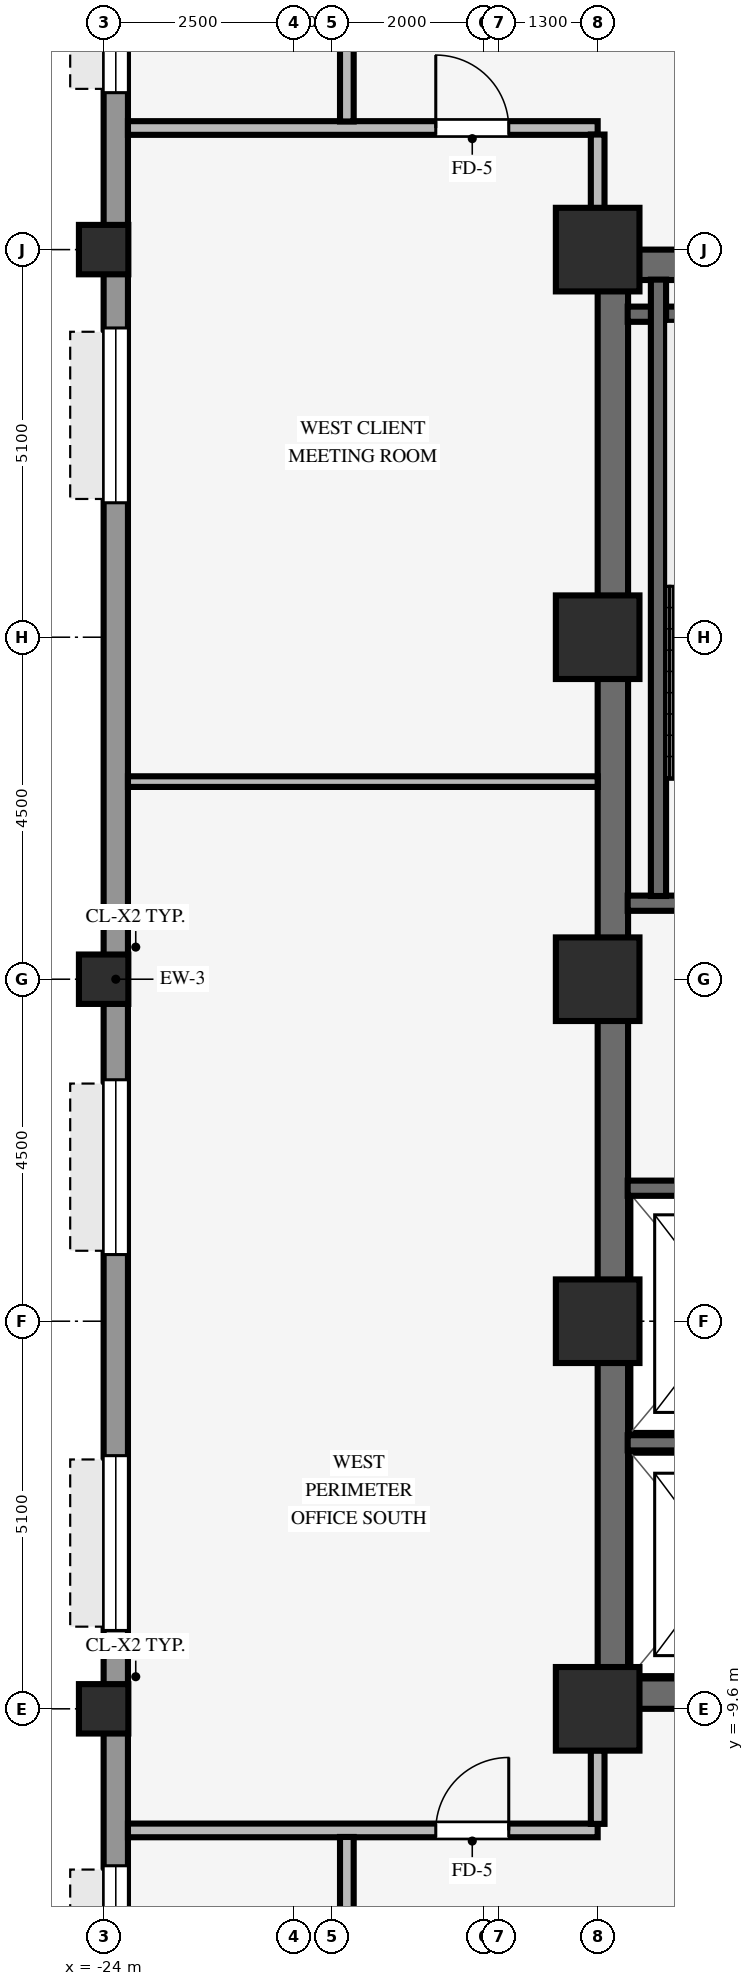
"""IFC4 building model, lengths in metres.
Left out: names, types, materials, properties, quantities, classifications, styles, units other than length and angle.
Written with IfcOpenShell. Run it as: python <this file> out.ifc"""

import sys

from ifc_helpers import new_model, si_unit, direction, frame, frame_2d, origin, origin_2d, place, context, subcontext, project, spatial, rectangle, hollow_rectangle, extrude, source, transform, mapped, element, fill, save


model = new_model("IFC4")
c1 = context("Model", 3, precision=1e-05, world=origin(), true_north=direction((0.0, 1.0)))
c2 = subcontext(c1, "Body", "Model", "MODEL_VIEW")
j1 = project(units=[si_unit("LENGTHUNIT", "METRE"), si_unit("PLANEANGLEUNIT", "RADIAN")], contexts=[c1])
p1 = place(None, origin())
s1 = spatial("IfcSite", under=j1, at=p1, CompositionType="ELEMENT")
p2 = place(p1, origin())
s2 = spatial("IfcBuilding", under=s1, at=p2, CompositionType="ELEMENT")
p3 = place(p2, frame((0.0, 0.0, 109.25)))
s3 = spatial("IfcBuildingStorey", under=s2, at=p3, CompositionType="ELEMENT", Elevation=109.25)
for number, where, z_axis, x_axis in (
    (1, (-17.5, -9.4, 0.0), (0.0, 0.0, 1.0), (1.0, 0.0, 0.0)),
    (2, (-17.5, 9.4, 0.0), (0.0, 0.0, 1.0), (1.0, 0.0, 0.0)),
):
    element("IfcWall", number, at=place(p3, frame(where, z_axis=z_axis, x_axis=x_axis)), inside=s3, PredefinedType="SHEAR", context=c2, shape_type="SweptSolid", body=[
        extrude(rectangle(XDim=8.5, YDim=0.4, at=frame_2d((4.25, 0.0))), origin(), (0.0, 0.0, 1.0), 3.37),
    ])
p4 = place(p3, frame((-17.3, -9.205, 0.0), z_axis=(0.0, 0.0, 1.0), x_axis=(0.0, 1.0, 0.0)))
e3 = element("IfcWall", 3, at=p4, inside=s3, PredefinedType="SHEAR", context=c2, shape_type="SweptSolid", body=[
    extrude(rectangle(XDim=18.41, YDim=0.4, at=frame_2d((9.205, 0.0))), origin(), (0.0, 0.0, 1.0), 3.37),
])
for number, where, z_axis, x_axis in (
    (4, (-17.5, -9.6, 0.0), (0.0, 0.0, 1.0), (1.0, 0.0, 0.0)),
    (5, (-17.5, -4.5, 0.0), (0.0, 0.0, 1.0), (1.0, 0.0, 0.0)),
    (6, (-17.5, 4.5, 0.0), (0.0, 0.0, 1.0), (1.0, 0.0, 0.0)),
    (7, (-17.5, 9.6, 0.0), (0.0, 0.0, 1.0), (1.0, 0.0, 0.0)),
    (8, (-17.5, 0.0, 0.0), (0.0, 0.0, 1.0), (1.0, 0.0, 0.0)),
):
    element("IfcColumn", number, at=place(p3, frame(where, z_axis=z_axis, x_axis=x_axis)), inside=s3, PredefinedType="COLUMN", context=c2, shape_type="SweptSolid", body=[
        extrude(rectangle(XDim=1.1, YDim=1.1, at=origin_2d()), origin(), (0.0, 0.0, 1.0), 3.37),
    ])
for number, where, z_axis, x_axis in (
    (9, (-24.0, -9.6, 0.0), (0.0, 0.0, 1.0), (1.0, 0.0, 0.0)),
    (10, (-24.0, 0.0, 0.0), (0.0, 0.0, 1.0), (1.0, 0.0, 0.0)),
    (11, (-24.0, 9.6, 0.0), (0.0, 0.0, 1.0), (1.0, 0.0, 0.0)),
):
    element("IfcColumn", number, at=place(p3, frame(where, z_axis=z_axis, x_axis=x_axis)), inside=s3, PredefinedType="COLUMN", context=c2, shape_type="SweptSolid", body=[
        extrude(hollow_rectangle(XDim=0.65, YDim=0.65, WallThickness=0.04, InnerFilletRadius=0.04, OuterFilletRadius=0.08, at=origin_2d()), origin(), (0.0, 0.0, 1.0), 3.37),
    ])
p5 = place(p3, frame((-23.84, -20.784, 0.0), z_axis=(0.0, 0.0, 1.0), x_axis=(0.0, 1.0, 0.0)))
e12 = element("IfcWall", 12, at=p5, inside=s3, PredefinedType="STANDARD", context=c2, shape_type="SweptSolid", body=[
    extrude(rectangle(XDim=41.568, YDim=0.32, at=frame_2d((20.784, 0.0))), origin(), (0.0, 0.0, 1.0), 2.705),
])
p6 = place(p5, frame((6.819, 0.0, 0.8)))
e13 = element("IfcOpeningElement", 13, at=p6, cuts=e12, PredefinedType="OPENING", context=c2, shape_type="SweptSolid", body=[
    extrude(rectangle(XDim=2.3, YDim=1.62, at=frame_2d((1.15, 0.81))), frame((0.0, 0.17, 0.0), z_axis=(0.0, -1.0, 0.0), x_axis=(1.0, 0.0, 0.0)), (0.0, 0.0, 1.0), 0.34),
])
p7 = place(p5, frame((12.215, 0.0, 0.8)))
e14 = element("IfcOpeningElement", 14, at=p7, cuts=e12, PredefinedType="OPENING", context=c2, shape_type="SweptSolid", body=[
    extrude(rectangle(XDim=2.3, YDim=1.62, at=frame_2d((1.15, 0.81))), frame((0.0, 0.17, 0.0), z_axis=(0.0, -1.0, 0.0), x_axis=(1.0, 0.0, 0.0)), (0.0, 0.0, 1.0), 0.34),
])
p8 = place(p5, frame((17.161, 0.0, 0.8)))
e15 = element("IfcOpeningElement", 15, at=p8, cuts=e12, PredefinedType="OPENING", context=c2, shape_type="SweptSolid", body=[
    extrude(rectangle(XDim=2.3, YDim=1.62, at=frame_2d((1.15, 0.81))), frame((0.0, 0.17, 0.0), z_axis=(0.0, -1.0, 0.0), x_axis=(1.0, 0.0, 0.0)), (0.0, 0.0, 1.0), 0.34),
])
p9 = place(p5, frame((27.053, 0.0, 0.8)))
e16 = element("IfcOpeningElement", 16, at=p9, cuts=e12, PredefinedType="OPENING", context=c2, shape_type="SweptSolid", body=[
    extrude(rectangle(XDim=2.3, YDim=1.62, at=frame_2d((1.15, 0.81))), frame((0.0, 0.17, 0.0), z_axis=(0.0, -1.0, 0.0), x_axis=(1.0, 0.0, 0.0)), (0.0, 0.0, 1.0), 0.34),
])
p10 = place(p5, frame((32.449, 0.0, 0.8)))
e17 = element("IfcOpeningElement", 17, at=p10, cuts=e12, PredefinedType="OPENING", context=c2, shape_type="SweptSolid", body=[
    extrude(rectangle(XDim=2.3, YDim=1.62, at=frame_2d((1.15, 0.81))), frame((0.0, 0.17, 0.0), z_axis=(0.0, -1.0, 0.0), x_axis=(1.0, 0.0, 0.0)), (0.0, 0.0, 1.0), 0.34),
])
for number, where, z_axis, x_axis in (
    (18, (-17.105, 1.0, 0.0), (0.0, 0.0, 1.0), (1.0, 0.0, 0.0)),
    (19, (-17.105, 8.75, 0.0), (0.0, 0.0, 1.0), (1.0, 0.0, 0.0)),
):
    element("IfcWall", number, at=place(p3, frame(where, z_axis=z_axis, x_axis=x_axis)), inside=s3, PredefinedType="SHEAR", context=c2, shape_type="SweptSolid", body=[
        extrude(rectangle(XDim=3.57, YDim=0.2, at=frame_2d((1.785, 0.0))), origin(), (0.0, 0.0, 1.0), 3.37),
    ])
p11 = place(p3, frame((-16.7, 1.095, 0.0), z_axis=(0.0, 0.0, 1.0), x_axis=(0.0, 1.0, 0.0)))
e20 = element("IfcWall", 20, at=p11, inside=s3, PredefinedType="SHEAR", context=c2, shape_type="SweptSolid", body=[
    extrude(rectangle(XDim=8.11, YDim=0.2, at=frame_2d((4.055, 0.0))), origin(), (0.0, 0.0, 1.0), 3.37),
])
p12 = place(p3, frame((-17.105, -6.1, 0.0), z_axis=(0.0, 0.0, 1.0), x_axis=(1.0, 0.0, 0.0)))
e21 = element("IfcWall", 21, at=p12, inside=s3, PredefinedType="SHEAR", context=c2, shape_type="SweptSolid", body=[
    extrude(rectangle(XDim=2.855, YDim=0.2, at=frame_2d((1.427, 0.0))), origin(), (0.0, 0.0, 1.0), 3.37),
])
p13 = place(p3, frame((-17.105, -2.75, 0.0), z_axis=(0.0, 0.0, 1.0), x_axis=(1.0, 0.0, 0.0)))
e22 = element("IfcWall", 22, at=p13, inside=s3, PredefinedType="SHEAR", context=c2, shape_type="SweptSolid", body=[
    extrude(rectangle(XDim=2.66, YDim=0.2, at=frame_2d((1.33, 0.0))), origin(), (0.0, 0.0, 1.0), 3.37),
])
p14 = place(p3, frame((-23.68, -11.2, 0.0), z_axis=(0.0, 0.0, 1.0), x_axis=(1.0, 0.0, 0.0)))
e23 = element("IfcWall", 23, at=p14, inside=s3, PredefinedType="PARTITIONING", context=c2, shape_type="SweptSolid", body=[
    extrude(rectangle(XDim=6.18, YDim=0.18, at=frame_2d((3.09, 0.0))), origin(), (0.0, 0.0, 1.0), 3.36),
])
p15 = place(p14, frame((4.05, 0.0, 0.0)))
e24 = element("IfcOpeningElement", 24, at=p15, cuts=e23, PredefinedType="OPENING", context=c2, shape_type="SweptSolid", body=[
    extrude(rectangle(XDim=0.96, YDim=2.1, at=frame_2d((0.48, 1.05))), frame((0.0, 0.1, 0.0), z_axis=(0.0, -1.0, 0.0), x_axis=(1.0, 0.0, 0.0)), (0.0, 0.0, 1.0), 0.2),
])
p16 = place(p3, frame((-23.68, 2.6, 0.0), z_axis=(0.0, 0.0, 1.0), x_axis=(1.0, 0.0, 0.0)))
e25 = element("IfcWall", 25, at=p16, inside=s3, PredefinedType="PARTITIONING", context=c2, shape_type="SweptSolid", body=[
    extrude(rectangle(XDim=6.18, YDim=0.14, at=frame_2d((3.09, 0.0))), origin(), (0.0, 0.0, 1.0), 3.36),
])
p17 = place(p3, frame((-23.68, 11.2, 0.0), z_axis=(0.0, 0.0, 1.0), x_axis=(1.0, 0.0, 0.0)))
e26 = element("IfcWall", 26, at=p17, inside=s3, PredefinedType="PARTITIONING", context=c2, shape_type="SweptSolid", body=[
    extrude(rectangle(XDim=6.18, YDim=0.18, at=frame_2d((3.09, 0.0))), origin(), (0.0, 0.0, 1.0), 3.36),
])
p18 = place(p17, frame((4.05, 0.0, 0.0)))
e27 = element("IfcOpeningElement", 27, at=p18, cuts=e26, PredefinedType="OPENING", context=c2, shape_type="SweptSolid", body=[
    extrude(rectangle(XDim=0.96, YDim=2.1, at=frame_2d((0.48, 1.05))), frame((0.0, 0.1, 0.0), z_axis=(0.0, -1.0, 0.0), x_axis=(1.0, 0.0, 0.0)), (0.0, 0.0, 1.0), 0.2),
])
for number, where, z_axis, x_axis in (
    (28, (-20.8, -13.514, 0.0), (0.0, 0.0, 1.0), (0.0, 1.0, 0.0)),
    (29, (-20.8, 11.286, 0.0), (0.0, 0.0, 1.0), (0.0, 1.0, 0.0)),
):
    element("IfcWall", number, at=place(p3, frame(where, z_axis=z_axis, x_axis=x_axis)), inside=s3, PredefinedType="PARTITIONING", context=c2, shape_type="SweptSolid", body=[
        extrude(rectangle(XDim=2.228, YDim=0.18, at=frame_2d((1.114, 0.0))), origin(), (0.0, 0.0, 1.0), 3.36),
    ])
for number, where, z_axis, x_axis in (
    (30, (-17.5, -11.114, 0.0), (0.0, 0.0, 1.0), (0.0, 1.0, 0.0)),
    (31, (-17.5, 10.146, 0.0), (0.0, 0.0, 1.0), (0.0, 1.0, 0.0)),
):
    element("IfcWall", number, at=place(p3, frame(where, z_axis=z_axis, x_axis=x_axis)), inside=s3, PredefinedType="PARTITIONING", context=c2, shape_type="SweptSolid", body=[
        extrude(rectangle(XDim=0.968, YDim=0.18, at=frame_2d((0.484, 0.0))), origin(), (0.0, 0.0, 1.0), 2.738),
    ])
m1 = source(origin(), c2, "Body", "SweptSolid", [
    extrude(rectangle(XDim=2.3, YDim=1.62, at=frame_2d((1.15, 0.81))), frame((0.0, 0.03, 0.0), z_axis=(0.0, -1.0, 0.0), x_axis=(1.0, 0.0, 0.0)), (0.0, 0.0, 1.0), 0.06),
])
p19 = place(p6, origin())
e32 = element("IfcWindow", 32, at=p19, inside=s3, PartitioningType="SINGLE_PANEL", PredefinedType="WINDOW", context=c2, shape_type="MappedRepresentation", body=[
    mapped(m1, transform((0.0, 0.0, 0.0), scale=1.0)),
])
fill(e13, e32)
p20 = place(p7, origin())
e33 = element("IfcWindow", 33, at=p20, inside=s3, PartitioningType="SINGLE_PANEL", PredefinedType="WINDOW", context=c2, shape_type="MappedRepresentation", body=[
    mapped(m1, transform((0.0, 0.0, 0.0), scale=1.0)),
])
fill(e14, e33)
p21 = place(p8, origin())
e34 = element("IfcWindow", 34, at=p21, inside=s3, PartitioningType="SINGLE_PANEL", PredefinedType="WINDOW", context=c2, shape_type="MappedRepresentation", body=[
    mapped(m1, transform((0.0, 0.0, 0.0), scale=1.0)),
])
fill(e15, e34)
p22 = place(p9, origin())
e35 = element("IfcWindow", 35, at=p22, inside=s3, PartitioningType="SINGLE_PANEL", PredefinedType="WINDOW", context=c2, shape_type="MappedRepresentation", body=[
    mapped(m1, transform((0.0, 0.0, 0.0), scale=1.0)),
])
fill(e16, e35)
p23 = place(p10, origin())
e36 = element("IfcWindow", 36, at=p23, inside=s3, PartitioningType="SINGLE_PANEL", PredefinedType="WINDOW", context=c2, shape_type="MappedRepresentation", body=[
    mapped(m1, transform((0.0, 0.0, 0.0), scale=1.0)),
])
fill(e17, e36)
m2 = source(origin(), c2, "Body", "SweptSolid", [
    extrude(rectangle(XDim=0.96, YDim=2.1, at=frame_2d((0.48, 1.05))), frame((0.0, 0.025, 0.0), z_axis=(0.0, -1.0, 0.0), x_axis=(1.0, 0.0, 0.0)), (0.0, 0.0, 1.0), 0.05),
])
p24 = place(p15, origin())
e37 = element("IfcDoor", 37, at=p24, inside=s3, OperationType="SINGLE_SWING_RIGHT", PredefinedType="DOOR", context=c2, shape_type="MappedRepresentation", body=[
    mapped(m2, transform((0.0, 0.0, 0.0), scale=1.0)),
])
fill(e24, e37)
p25 = place(p18, origin())
e38 = element("IfcDoor", 38, at=p25, inside=s3, OperationType="SINGLE_SWING_LEFT", PredefinedType="DOOR", context=c2, shape_type="MappedRepresentation", body=[
    mapped(m2, transform((0.0, 0.0, 0.0), scale=1.0)),
])
fill(e27, e38)
save(model, sys.argv[1])
